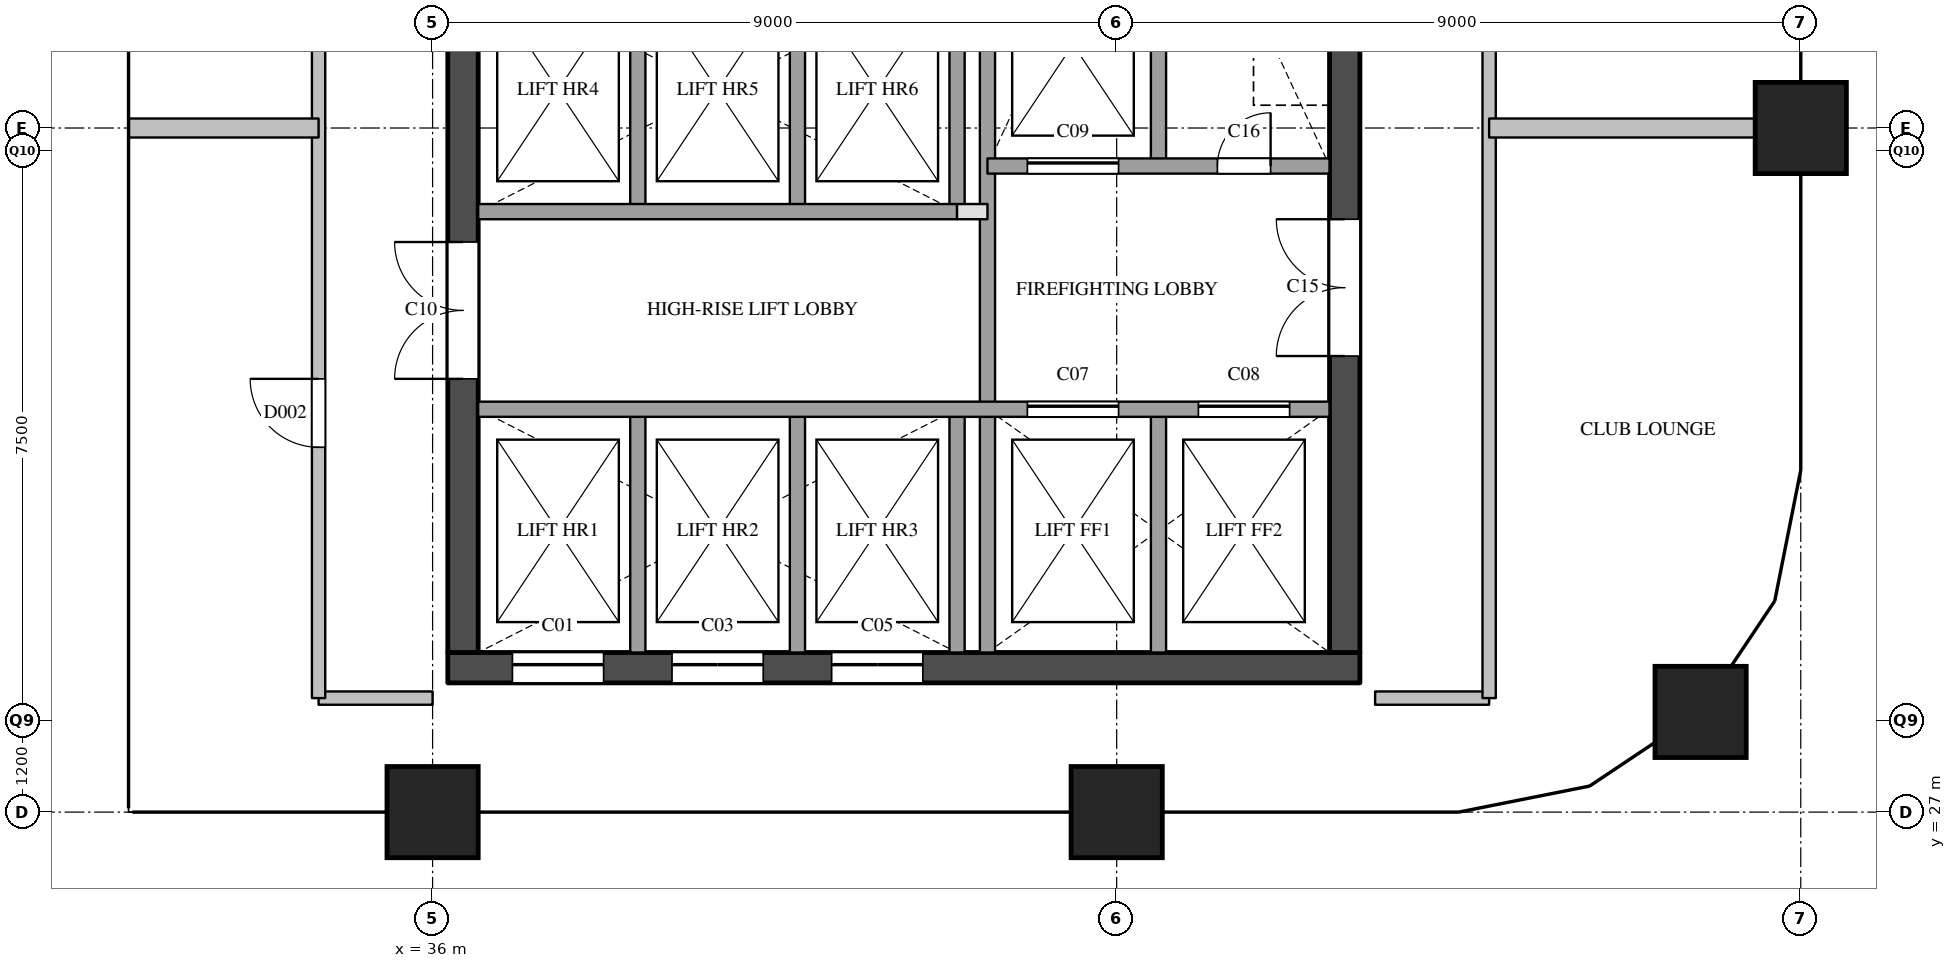
"""IFC4 building model, lengths in metres.
Left out: names, types, materials, properties, quantities, classifications, styles, units other than length and angle.
Written with IfcOpenShell. Run it as: python <this file> out.ifc"""

import sys

from ifc_helpers import new_model, si_unit, direction, frame, frame_2d, origin, origin_2d, place, context, subcontext, project, spatial, rectangle, extrude, element, fill, save


model = new_model("IFC4")
c1 = context("Model", 3, precision=1e-05, world=origin(), true_north=direction((0.0, 1.0)))
c2 = subcontext(c1, "Body", "Model", "MODEL_VIEW")
j1 = project(units=[si_unit("LENGTHUNIT", "METRE"), si_unit("PLANEANGLEUNIT", "RADIAN")], contexts=[c1])
p1 = place(None, origin())
s1 = spatial("IfcSite", under=j1, at=p1, CompositionType="ELEMENT")
p2 = place(p1, origin())
s2 = spatial("IfcBuilding", under=s1, at=p2, CompositionType="ELEMENT")
p3 = place(p2, frame((0.0, 0.0, 211.1)))
s3 = spatial("IfcBuildingStorey", under=s2, at=p3, CompositionType="ELEMENT", Elevation=211.1)
for number, where, z_axis, x_axis in (
    (1, (36.0, 27.0, 0.0), (0.0, 0.0, 1.0), (1.0, 0.0, 0.0)),
    (2, (45.0, 27.0, 0.0), (0.0, 0.0, 1.0), (1.0, 0.0, 0.0)),
    (3, (52.682, 28.318, 0.0), (0.0, 0.0, 1.0), (1.0, 0.0, 0.0)),
    (4, (54.0, 36.0, 0.0), (0.0, 0.0, 1.0), (1.0, 0.0, 0.0)),
):
    element("IfcColumn", number, at=place(p3, frame(where, z_axis=z_axis, x_axis=x_axis)), inside=s3, PredefinedType="COLUMN", context=c2, shape_type="SweptSolid", body=[
        extrude(rectangle(XDim=1.2, YDim=1.2, at=origin_2d()), origin(), (0.0, 0.0, 1.0), 3.9),
    ])
p4 = place(p3, frame((36.2, 28.9, 0.0), z_axis=(0.0, 0.0, 1.0), x_axis=(1.0, 0.0, 0.0)))
e5 = element("IfcWall", 5, at=p4, inside=s3, PredefinedType="SHEAR", context=c2, shape_type="SweptSolid", body=[
    extrude(rectangle(XDim=12.0, YDim=0.4, at=frame_2d((6.0, 0.0))), origin(), (0.0, 0.0, 1.0), 3.6),
])
p5 = place(p4, frame((0.85, 0.0, 0.0)))
e6 = element("IfcOpeningElement", 6, at=p5, cuts=e5, PredefinedType="OPENING", context=c2, shape_type="SweptSolid", body=[
    extrude(rectangle(XDim=1.2, YDim=2.1, at=frame_2d((0.6, 1.05))), frame((0.0, 0.21, 0.0), z_axis=(0.0, -1.0, 0.0), x_axis=(1.0, 0.0, 0.0)), (0.0, 0.0, 1.0), 0.42),
])
p6 = place(p4, frame((2.95, 0.0, 0.0)))
e7 = element("IfcOpeningElement", 7, at=p6, cuts=e5, PredefinedType="OPENING", context=c2, shape_type="SweptSolid", body=[
    extrude(rectangle(XDim=1.2, YDim=2.1, at=frame_2d((0.6, 1.05))), frame((0.0, 0.21, 0.0), z_axis=(0.0, -1.0, 0.0), x_axis=(1.0, 0.0, 0.0)), (0.0, 0.0, 1.0), 0.42),
])
p7 = place(p4, frame((5.05, 0.0, 0.0)))
e8 = element("IfcOpeningElement", 8, at=p7, cuts=e5, PredefinedType="OPENING", context=c2, shape_type="SweptSolid", body=[
    extrude(rectangle(XDim=1.2, YDim=2.1, at=frame_2d((0.6, 1.05))), frame((0.0, 0.21, 0.0), z_axis=(0.0, -1.0, 0.0), x_axis=(1.0, 0.0, 0.0)), (0.0, 0.0, 1.0), 0.42),
])
p8 = place(p3, frame((36.4, 29.1, 0.0), z_axis=(0.0, 0.0, 1.0), x_axis=(0.0, 1.0, 0.0)))
e9 = element("IfcWall", 9, at=p8, inside=s3, PredefinedType="SHEAR", context=c2, shape_type="SweptSolid", body=[
    extrude(rectangle(XDim=20.3, YDim=0.4, at=frame_2d((10.15, 0.0))), origin(), (0.0, 0.0, 1.0), 3.6),
])
p9 = place(p8, frame((3.6, 0.0, 0.0)))
e10 = element("IfcOpeningElement", 10, at=p9, cuts=e9, PredefinedType="OPENING", context=c2, shape_type="SweptSolid", body=[
    extrude(rectangle(XDim=1.8, YDim=2.1, at=frame_2d((0.9, 1.05))), frame((0.0, 0.21, 0.0), z_axis=(0.0, -1.0, 0.0), x_axis=(1.0, 0.0, 0.0)), (0.0, 0.0, 1.0), 0.42),
])
p10 = place(p8, frame((16.4, 0.0, 0.0)))
e11 = element("IfcOpeningElement", 11, at=p10, cuts=e9, PredefinedType="OPENING", context=c2, shape_type="SweptSolid", body=[
    extrude(rectangle(XDim=1.0, YDim=2.1, at=frame_2d((0.5, 1.05))), frame((0.0, 0.21, 0.0), z_axis=(0.0, -1.0, 0.0), x_axis=(1.0, 0.0, 0.0)), (0.0, 0.0, 1.0), 0.42),
])
p11 = place(p3, frame((48.0, 29.1, 0.0), z_axis=(0.0, 0.0, 1.0), x_axis=(0.0, 1.0, 0.0)))
e12 = element("IfcWall", 12, at=p11, inside=s3, PredefinedType="SHEAR", context=c2, shape_type="SweptSolid", body=[
    extrude(rectangle(XDim=20.3, YDim=0.4, at=frame_2d((10.15, 0.0))), origin(), (0.0, 0.0, 1.0), 3.6),
])
p12 = place(p11, frame((12.5, 0.0, 0.0)))
e13 = element("IfcOpeningElement", 13, at=p12, cuts=e12, PredefinedType="OPENING", context=c2, shape_type="SweptSolid", body=[
    extrude(rectangle(XDim=0.7, YDim=2.1, at=frame_2d((0.35, 1.05))), frame((0.0, 0.21, 0.0), z_axis=(0.0, -1.0, 0.0), x_axis=(1.0, 0.0, 0.0)), (0.0, 0.0, 1.0), 0.42),
])
p13 = place(p11, frame((3.9, 0.0, 0.0)))
e14 = element("IfcOpeningElement", 14, at=p13, cuts=e12, PredefinedType="OPENING", context=c2, shape_type="SweptSolid", body=[
    extrude(rectangle(XDim=1.8, YDim=2.1, at=frame_2d((0.9, 1.05))), frame((0.0, 0.21, 0.0), z_axis=(0.0, -1.0, 0.0), x_axis=(1.0, 0.0, 0.0)), (0.0, 0.0, 1.0), 0.42),
])
p14 = place(p3, frame((38.7, 29.1, 0.0), z_axis=(0.0, 0.0, 1.0), x_axis=(0.0, 1.0, 0.0)))
e15 = element("IfcWall", 15, at=p14, inside=s3, PredefinedType="SOLIDWALL", context=c2, shape_type="SweptSolid", body=[
    extrude(rectangle(XDim=3.2, YDim=0.2, at=frame_2d((1.6, 0.0))), origin(), (0.0, 0.0, 1.0), 3.6),
])
p15 = place(p3, frame((38.7, 34.9, 0.0), z_axis=(0.0, 0.0, 1.0), x_axis=(0.0, 1.0, 0.0)))
e16 = element("IfcWall", 16, at=p15, inside=s3, PredefinedType="SOLIDWALL", context=c2, shape_type="SweptSolid", body=[
    extrude(rectangle(XDim=3.2, YDim=0.2, at=frame_2d((1.6, 0.0))), origin(), (0.0, 0.0, 1.0), 3.6),
])
p16 = place(p3, frame((40.8, 29.1, 0.0), z_axis=(0.0, 0.0, 1.0), x_axis=(0.0, 1.0, 0.0)))
e17 = element("IfcWall", 17, at=p16, inside=s3, PredefinedType="SOLIDWALL", context=c2, shape_type="SweptSolid", body=[
    extrude(rectangle(XDim=3.2, YDim=0.2, at=frame_2d((1.6, 0.0))), origin(), (0.0, 0.0, 1.0), 3.6),
])
p17 = place(p3, frame((40.8, 34.9, 0.0), z_axis=(0.0, 0.0, 1.0), x_axis=(0.0, 1.0, 0.0)))
e18 = element("IfcWall", 18, at=p17, inside=s3, PredefinedType="SOLIDWALL", context=c2, shape_type="SweptSolid", body=[
    extrude(rectangle(XDim=3.2, YDim=0.2, at=frame_2d((1.6, 0.0))), origin(), (0.0, 0.0, 1.0), 3.6),
])
p18 = place(p3, frame((42.9, 29.1, 0.0), z_axis=(0.0, 0.0, 1.0), x_axis=(0.0, 1.0, 0.0)))
e19 = element("IfcWall", 19, at=p18, inside=s3, PredefinedType="SOLIDWALL", context=c2, shape_type="SweptSolid", body=[
    extrude(rectangle(XDim=3.2, YDim=0.2, at=frame_2d((1.6, 0.0))), origin(), (0.0, 0.0, 1.0), 3.6),
])
p19 = place(p3, frame((42.9, 34.9, 0.0), z_axis=(0.0, 0.0, 1.0), x_axis=(0.0, 1.0, 0.0)))
e20 = element("IfcWall", 20, at=p19, inside=s3, PredefinedType="SOLIDWALL", context=c2, shape_type="SweptSolid", body=[
    extrude(rectangle(XDim=3.2, YDim=0.2, at=frame_2d((1.6, 0.0))), origin(), (0.0, 0.0, 1.0), 3.6),
])
p20 = place(p3, frame((43.3, 29.1, 0.0), z_axis=(0.0, 0.0, 1.0), x_axis=(0.0, 1.0, 0.0)))
e21 = element("IfcWall", 21, at=p20, inside=s3, PredefinedType="SOLIDWALL", context=c2, shape_type="SweptSolid", body=[
    extrude(rectangle(XDim=9.9, YDim=0.2, at=frame_2d((4.95, 0.0))), origin(), (0.0, 0.0, 1.0), 3.6),
])
for number, where, z_axis, x_axis in (
    (22, (45.55, 29.1, 0.0), (0.0, 0.0, 1.0), (0.0, 1.0, 0.0)),
    (23, (45.55, 35.5, 0.0), (0.0, 0.0, 1.0), (0.0, 1.0, 0.0)),
):
    element("IfcWall", number, at=place(p3, frame(where, z_axis=z_axis, x_axis=x_axis)), inside=s3, PredefinedType="SOLIDWALL", context=c2, shape_type="SweptSolid", body=[
        extrude(rectangle(XDim=3.2, YDim=0.2, at=frame_2d((1.6, 0.0))), origin(), (0.0, 0.0, 1.0), 3.6),
    ])
p21 = place(p3, frame((36.6, 32.3, 0.0), z_axis=(0.0, 0.0, 1.0), x_axis=(1.0, 0.0, 0.0)))
e24 = element("IfcWall", 24, at=p21, inside=s3, PredefinedType="SOLIDWALL", context=c2, shape_type="SweptSolid", body=[
    extrude(rectangle(XDim=11.2, YDim=0.2, at=frame_2d((5.6, 0.0))), origin(), (0.0, 0.0, 1.0), 3.6),
])
p22 = place(p21, frame((7.225, 0.0, 0.0)))
e25 = element("IfcOpeningElement", 25, at=p22, cuts=e24, PredefinedType="OPENING", context=c2, shape_type="SweptSolid", body=[
    extrude(rectangle(XDim=1.2, YDim=2.1, at=frame_2d((0.6, 1.05))), frame((0.0, 0.11, 0.0), z_axis=(0.0, -1.0, 0.0), x_axis=(1.0, 0.0, 0.0)), (0.0, 0.0, 1.0), 0.22),
])
p23 = place(p21, frame((9.475, 0.0, 0.0)))
e26 = element("IfcOpeningElement", 26, at=p23, cuts=e24, PredefinedType="OPENING", context=c2, shape_type="SweptSolid", body=[
    extrude(rectangle(XDim=1.2, YDim=2.1, at=frame_2d((0.6, 1.05))), frame((0.0, 0.11, 0.0), z_axis=(0.0, -1.0, 0.0), x_axis=(1.0, 0.0, 0.0)), (0.0, 0.0, 1.0), 0.22),
])
p24 = place(p3, frame((42.9, 34.9, 0.0), z_axis=(0.0, 0.0, 1.0), x_axis=(1.0, 0.0, 0.0)))
e27 = element("IfcWall", 27, at=p24, inside=s3, PredefinedType="PARTITIONING", context=c2, shape_type="SweptSolid", body=[
    extrude(rectangle(XDim=0.4, YDim=0.2, at=frame_2d((0.2, 0.0))), origin(), (0.0, 0.0, 1.0), 3.6),
])
p25 = place(p3, frame((36.6, 34.9, 0.0), z_axis=(0.0, 0.0, 1.0), x_axis=(1.0, 0.0, 0.0)))
e28 = element("IfcWall", 28, at=p25, inside=s3, PredefinedType="SOLIDWALL", context=c2, shape_type="SweptSolid", body=[
    extrude(rectangle(XDim=6.3, YDim=0.2, at=frame_2d((3.15, 0.0))), origin(), (0.0, 0.0, 1.0), 3.6),
])
p26 = place(p3, frame((43.3, 35.5, 0.0), z_axis=(0.0, 0.0, 1.0), x_axis=(1.0, 0.0, 0.0)))
e29 = element("IfcWall", 29, at=p26, inside=s3, PredefinedType="SOLIDWALL", context=c2, shape_type="SweptSolid", body=[
    extrude(rectangle(XDim=4.5, YDim=0.2, at=frame_2d((2.25, 0.0))), origin(), (0.0, 0.0, 1.0), 3.6),
])
p27 = place(p26, frame((0.525, 0.0, 0.0)))
e30 = element("IfcOpeningElement", 30, at=p27, cuts=e29, PredefinedType="OPENING", context=c2, shape_type="SweptSolid", body=[
    extrude(rectangle(XDim=1.2, YDim=2.1, at=frame_2d((0.6, 1.05))), frame((0.0, 0.11, 0.0), z_axis=(0.0, -1.0, 0.0), x_axis=(1.0, 0.0, 0.0)), (0.0, 0.0, 1.0), 0.22),
])
p28 = place(p26, frame((3.025, 0.0, 0.0)))
e31 = element("IfcOpeningElement", 31, at=p28, cuts=e29, PredefinedType="OPENING", context=c2, shape_type="SweptSolid", body=[
    extrude(rectangle(XDim=0.7, YDim=2.1, at=frame_2d((0.35, 1.05))), frame((0.0, 0.11, 0.0), z_axis=(0.0, -1.0, 0.0), x_axis=(1.0, 0.0, 0.0)), (0.0, 0.0, 1.0), 0.22),
])
for number, where, z_axis, x_axis in (
    (32, (34.5, 28.5, 0.0), (0.0, 0.0, 1.0), (1.0, 0.0, 0.0)),
    (33, (48.4, 28.5, 0.0), (0.0, 0.0, 1.0), (1.0, 0.0, 0.0)),
):
    element("IfcWall", number, at=place(p3, frame(where, z_axis=z_axis, x_axis=x_axis)), inside=s3, PredefinedType="PARTITIONING", context=c2, shape_type="SweptSolid", body=[
        extrude(rectangle(XDim=1.5, YDim=0.175, at=frame_2d((0.75, 0.0))), origin(), (0.0, 0.0, 1.0), 3.6),
    ])
p29 = place(p3, frame((34.5, 28.5, 0.0), z_axis=(0.0, 0.0, 1.0), x_axis=(0.0, 1.0, 0.0)))
e34 = element("IfcWall", 34, at=p29, inside=s3, PredefinedType="PARTITIONING", context=c2, shape_type="SweptSolid", body=[
    extrude(rectangle(XDim=10.75, YDim=0.175, at=frame_2d((5.375, 0.0))), origin(), (0.0, 0.0, 1.0), 3.6),
])
p30 = place(p29, frame((3.3, 0.0, 0.0)))
e35 = element("IfcOpeningElement", 35, at=p30, cuts=e34, PredefinedType="OPENING", context=c2, shape_type="SweptSolid", body=[
    extrude(rectangle(XDim=0.9, YDim=2.1, at=frame_2d((0.45, 1.05))), frame((0.0, 0.097, 0.0), z_axis=(0.0, -1.0, 0.0), x_axis=(1.0, 0.0, 0.0)), (0.0, 0.0, 1.0), 0.195),
])
p31 = place(p29, frame((8.625, 0.0, 0.0)))
e36 = element("IfcOpeningElement", 36, at=p31, cuts=e34, PredefinedType="OPENING", context=c2, shape_type="SweptSolid", body=[
    extrude(rectangle(XDim=1.0, YDim=2.1, at=frame_2d((0.5, 1.05))), frame((0.0, 0.097, 0.0), z_axis=(0.0, -1.0, 0.0), x_axis=(1.0, 0.0, 0.0)), (0.0, 0.0, 1.0), 0.195),
])
p32 = place(p3, frame((49.9, 28.5, 0.0), z_axis=(0.0, 0.0, 1.0), x_axis=(0.0, 1.0, 0.0)))
e37 = element("IfcWall", 37, at=p32, inside=s3, PredefinedType="PARTITIONING", context=c2, shape_type="SweptSolid", body=[
    extrude(rectangle(XDim=23.0, YDim=0.175, at=frame_2d((11.5, 0.0))), origin(), (0.0, 0.0, 1.0), 3.6),
])
p33 = place(p32, frame((14.8, 0.0, 0.0)))
e38 = element("IfcOpeningElement", 38, at=p33, cuts=e37, PredefinedType="OPENING", context=c2, shape_type="SweptSolid", body=[
    extrude(rectangle(XDim=0.9, YDim=2.1, at=frame_2d((0.45, 1.05))), frame((0.0, 0.097, 0.0), z_axis=(0.0, -1.0, 0.0), x_axis=(1.0, 0.0, 0.0)), (0.0, 0.0, 1.0), 0.195),
])
p34 = place(p3, frame((32.0, 36.0, 0.0), z_axis=(0.0, 0.0, 1.0), x_axis=(1.0, 0.0, 0.0)))
e39 = element("IfcWall", 39, at=p34, inside=s3, PredefinedType="PARTITIONING", context=c2, shape_type="SweptSolid", body=[
    extrude(rectangle(XDim=2.5, YDim=0.25, at=frame_2d((1.25, 0.0))), origin(), (0.0, 0.0, 1.0), 3.6),
])
p35 = place(p3, frame((49.9, 36.0, 0.0), z_axis=(0.0, 0.0, 1.0), x_axis=(1.0, 0.0, 0.0)))
e40 = element("IfcWall", 40, at=p35, inside=s3, PredefinedType="PARTITIONING", context=c2, shape_type="SweptSolid", body=[
    extrude(rectangle(XDim=4.1, YDim=0.25, at=frame_2d((2.05, 0.0))), origin(), (0.0, 0.0, 1.0), 3.6),
])
p36 = place(p5, origin())
e41 = element("IfcDoor", 41, at=p36, inside=s3, OperationType="SLIDING_TO_LEFT", PredefinedType="DOOR", context=c2, shape_type="SweptSolid", body=[
    extrude(rectangle(XDim=1.2, YDim=2.1, at=frame_2d((0.6, 1.05))), frame((0.0, 0.025, 0.0), z_axis=(0.0, -1.0, 0.0), x_axis=(1.0, 0.0, 0.0)), (0.0, 0.0, 1.0), 0.05),
])
fill(e6, e41)
p37 = place(p6, origin())
e42 = element("IfcDoor", 42, at=p37, inside=s3, OperationType="SLIDING_TO_LEFT", PredefinedType="DOOR", context=c2, shape_type="SweptSolid", body=[
    extrude(rectangle(XDim=1.2, YDim=2.1, at=frame_2d((0.6, 1.05))), frame((0.0, 0.025, 0.0), z_axis=(0.0, -1.0, 0.0), x_axis=(1.0, 0.0, 0.0)), (0.0, 0.0, 1.0), 0.05),
])
fill(e7, e42)
p38 = place(p7, origin())
e43 = element("IfcDoor", 43, at=p38, inside=s3, OperationType="SLIDING_TO_LEFT", PredefinedType="DOOR", context=c2, shape_type="SweptSolid", body=[
    extrude(rectangle(XDim=1.2, YDim=2.1, at=frame_2d((0.6, 1.05))), frame((0.0, 0.025, 0.0), z_axis=(0.0, -1.0, 0.0), x_axis=(1.0, 0.0, 0.0)), (0.0, 0.0, 1.0), 0.05),
])
fill(e8, e43)
p39 = place(p22, origin())
e44 = element("IfcDoor", 44, at=p39, inside=s3, OperationType="SLIDING_TO_LEFT", PredefinedType="DOOR", context=c2, shape_type="SweptSolid", body=[
    extrude(rectangle(XDim=1.2, YDim=2.1, at=frame_2d((0.6, 1.05))), frame((0.0, 0.025, 0.0), z_axis=(0.0, -1.0, 0.0), x_axis=(1.0, 0.0, 0.0)), (0.0, 0.0, 1.0), 0.05),
])
fill(e25, e44)
p40 = place(p23, origin())
e45 = element("IfcDoor", 45, at=p40, inside=s3, OperationType="SLIDING_TO_LEFT", PredefinedType="DOOR", context=c2, shape_type="SweptSolid", body=[
    extrude(rectangle(XDim=1.2, YDim=2.1, at=frame_2d((0.6, 1.05))), frame((0.0, 0.025, 0.0), z_axis=(0.0, -1.0, 0.0), x_axis=(1.0, 0.0, 0.0)), (0.0, 0.0, 1.0), 0.05),
])
fill(e26, e45)
p41 = place(p27, origin())
e46 = element("IfcDoor", 46, at=p41, inside=s3, OperationType="SLIDING_TO_LEFT", PredefinedType="DOOR", context=c2, shape_type="SweptSolid", body=[
    extrude(rectangle(XDim=1.2, YDim=2.1, at=frame_2d((0.6, 1.05))), frame((0.0, 0.025, 0.0), z_axis=(0.0, -1.0, 0.0), x_axis=(1.0, 0.0, 0.0)), (0.0, 0.0, 1.0), 0.05),
])
fill(e30, e46)
p42 = place(p9, origin())
e47 = element("IfcDoor", 47, at=p42, inside=s3, OperationType="DOUBLE_DOOR_SINGLE_SWING", PredefinedType="DOOR", context=c2, shape_type="SweptSolid", body=[
    extrude(rectangle(XDim=1.8, YDim=2.1, at=frame_2d((0.9, 1.05))), frame((0.0, 0.025, 0.0), z_axis=(0.0, -1.0, 0.0), x_axis=(1.0, 0.0, 0.0)), (0.0, 0.0, 1.0), 0.05),
])
fill(e10, e47)
p43 = place(p13, origin())
e48 = element("IfcDoor", 48, at=p43, inside=s3, OperationType="DOUBLE_DOOR_SINGLE_SWING", PredefinedType="DOOR", context=c2, shape_type="SweptSolid", body=[
    extrude(rectangle(XDim=1.8, YDim=2.1, at=frame_2d((0.9, 1.05))), frame((0.0, 0.025, 0.0), z_axis=(0.0, -1.0, 0.0), x_axis=(1.0, 0.0, 0.0)), (0.0, 0.0, 1.0), 0.05),
])
fill(e14, e48)
p44 = place(p28, origin())
e49 = element("IfcDoor", 49, at=p44, inside=s3, OperationType="SINGLE_SWING_RIGHT", PredefinedType="DOOR", context=c2, shape_type="SweptSolid", body=[
    extrude(rectangle(XDim=0.7, YDim=2.1, at=frame_2d((0.35, 1.05))), frame((0.0, 0.025, 0.0), z_axis=(0.0, -1.0, 0.0), x_axis=(1.0, 0.0, 0.0)), (0.0, 0.0, 1.0), 0.05),
])
fill(e31, e49)
p45 = place(p30, origin())
e50 = element("IfcDoor", 50, at=p45, inside=s3, OperationType="SINGLE_SWING_RIGHT", PredefinedType="DOOR", context=c2, shape_type="SweptSolid", body=[
    extrude(rectangle(XDim=0.9, YDim=2.1, at=frame_2d((0.45, 1.05))), frame((0.0, 0.025, 0.0), z_axis=(0.0, -1.0, 0.0), x_axis=(1.0, 0.0, 0.0)), (0.0, 0.0, 1.0), 0.05),
])
fill(e35, e50)
save(model, sys.argv[1])
